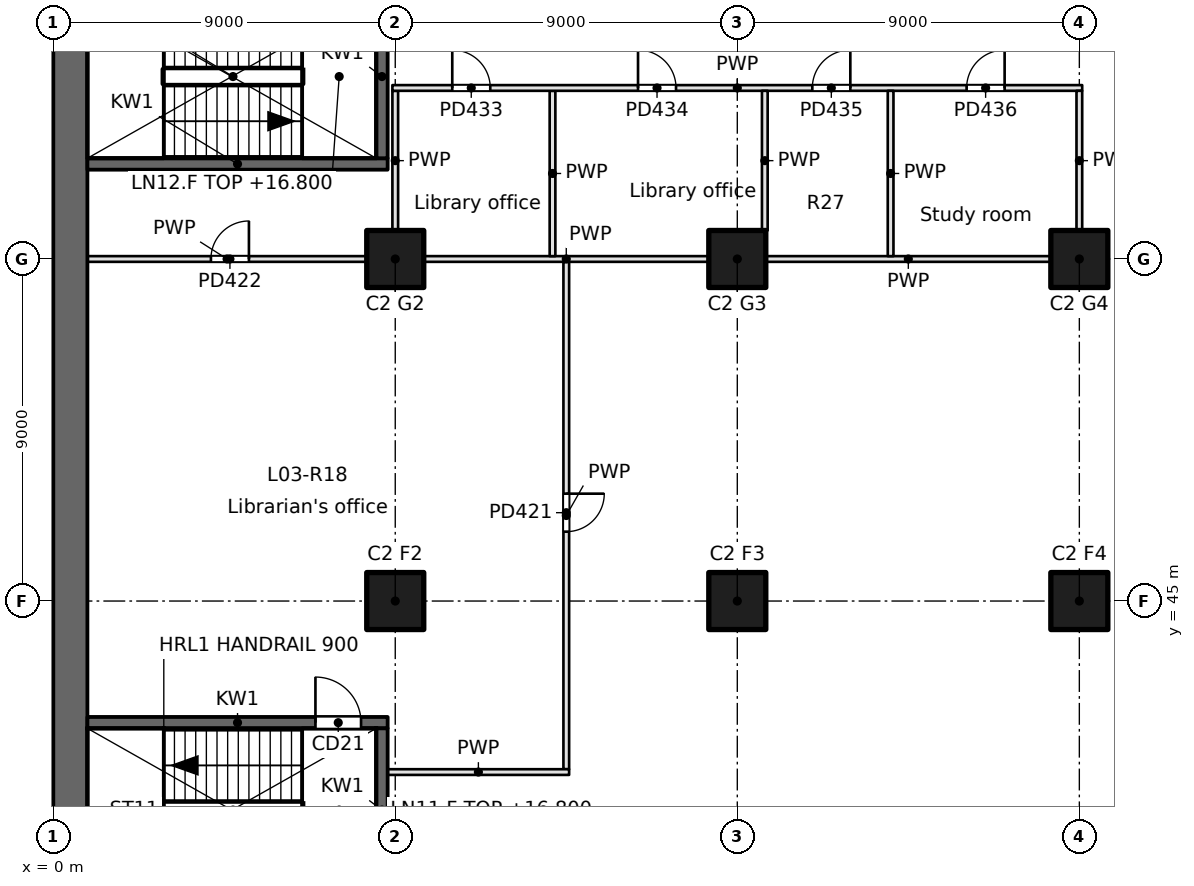
"""IFC4 building model, lengths in metres.
Left out: names, types, materials, properties, quantities, classifications, styles, units other than length and angle.
Written with IfcOpenShell. Run it as: python <this file> out.ifc"""

import sys

from ifc_helpers import new_model, si_unit, direction, frame, frame_2d, origin, origin_2d, place, context, subcontext, project, spatial, rectangle, extrude, element, fill, save


model = new_model("IFC4")
c1 = context("Model", 3, precision=1e-05, world=origin(), true_north=direction((0.0, 1.0)))
c2 = subcontext(c1, "Body", "Model", "MODEL_VIEW")
j1 = project(units=[si_unit("LENGTHUNIT", "METRE"), si_unit("PLANEANGLEUNIT", "RADIAN")], contexts=[c1])
p1 = place(None, origin())
s1 = spatial("IfcSite", under=j1, at=p1, CompositionType="ELEMENT")
p2 = place(p1, origin())
s2 = spatial("IfcBuilding", under=s1, at=p2, CompositionType="ELEMENT")
p3 = place(p2, frame((0.0, 0.0, 16.8)))
s3 = spatial("IfcBuildingStorey", under=s2, at=p3, CompositionType="ELEMENT", Elevation=16.8)
for number, where, z_axis, x_axis in (
    (1, (9.0, 45.0, 0.0), (0.0, 0.0, 1.0), (1.0, 0.0, 0.0)),
    (2, (9.0, 54.0, 0.0), (0.0, 0.0, 1.0), (1.0, 0.0, 0.0)),
    (3, (18.0, 45.0, 0.0), (0.0, 0.0, 1.0), (1.0, 0.0, 0.0)),
    (4, (18.0, 54.0, 0.0), (0.0, 0.0, 1.0), (1.0, 0.0, 0.0)),
    (5, (27.0, 45.0, 0.0), (0.0, 0.0, 1.0), (1.0, 0.0, 0.0)),
    (6, (27.0, 54.0, 0.0), (0.0, 0.0, 1.0), (1.0, 0.0, 0.0)),
):
    element("IfcColumn", number, at=place(p3, frame(where, z_axis=z_axis, x_axis=x_axis)), inside=s3, PredefinedType="COLUMN", context=c2, shape_type="SweptSolid", body=[
        extrude(rectangle(XDim=1.5, YDim=1.5, at=origin_2d()), origin(), (0.0, 0.0, 1.0), 4.8),
    ])
p4 = place(p3, frame((0.45, 94.5, 0.0), z_axis=(0.0, 0.0, 1.0), x_axis=(0.0, -1.0, 0.0)))
e7 = element("IfcWall", 7, at=p4, inside=s3, PredefinedType="SHEAR", context=c2, shape_type="SweptSolid", body=[
    extrude(rectangle(XDim=66.085, YDim=0.9, at=frame_2d((33.042, 0.0))), origin(), (0.0, 0.0, 1.0), 4.8),
])
p5 = place(p3, frame((0.9, 41.8, -0.35), z_axis=(0.0, 0.0, 1.0), x_axis=(1.0, 0.0, 0.0)))
e8 = element("IfcWall", 8, at=p5, inside=s3, PredefinedType="SOLIDWALL", context=c2, shape_type="SweptSolid", body=[
    extrude(rectangle(XDim=7.9, YDim=0.3, at=frame_2d((3.95, 0.0))), origin(), (0.0, 0.0, 1.0), 4.8),
])
p6 = place(p5, frame((6.0, 0.0, 0.35)))
e9 = element("IfcOpeningElement", 9, at=p6, cuts=e8, PredefinedType="OPENING", context=c2, shape_type="SweptSolid", body=[
    extrude(rectangle(XDim=1.2, YDim=2.1, at=frame_2d((0.6, 1.05))), frame((0.0, 0.15, 0.0), z_axis=(0.0, -1.0, 0.0), x_axis=(1.0, 0.0, 0.0)), (0.0, 0.0, 1.0), 0.3),
])
p7 = place(p3, frame((0.9, 56.5, -0.35), z_axis=(0.0, 0.0, 1.0), x_axis=(1.0, 0.0, 0.0)))
e10 = element("IfcWall", 10, at=p7, inside=s3, PredefinedType="SOLIDWALL", context=c2, shape_type="SweptSolid", body=[
    extrude(rectangle(XDim=7.9, YDim=0.3, at=frame_2d((3.95, 0.0))), origin(), (0.0, 0.0, 1.0), 4.8),
])
p8 = place(p3, frame((8.65, 37.35, -0.35), z_axis=(0.0, 0.0, 1.0), x_axis=(0.0, 1.0, 0.0)))
e11 = element("IfcWall", 11, at=p8, inside=s3, PredefinedType="SOLIDWALL", context=c2, shape_type="SweptSolid", body=[
    extrude(rectangle(XDim=4.3, YDim=0.3, at=frame_2d((2.15, 0.0))), origin(), (0.0, 0.0, 1.0), 4.8),
])
p9 = place(p3, frame((8.65, 56.65, -0.35), z_axis=(0.0, 0.0, 1.0), x_axis=(0.0, 1.0, 0.0)))
e12 = element("IfcWall", 12, at=p9, inside=s3, PredefinedType="SOLIDWALL", context=c2, shape_type="SweptSolid", body=[
    extrude(rectangle(XDim=4.3, YDim=0.3, at=frame_2d((2.15, 0.0))), origin(), (0.0, 0.0, 1.0), 4.8),
])
p10 = place(p3, frame((0.9, 54.0, 0.0), z_axis=(0.0, 0.0, 1.0), x_axis=(1.0, 0.0, 0.0)))
e13 = element("IfcWall", 13, at=p10, inside=s3, PredefinedType="PARTITIONING", context=c2, shape_type="SweptSolid", body=[
    extrude(rectangle(XDim=7.35, YDim=0.15, at=frame_2d((3.675, 0.0))), origin(), (0.0, 0.0, 1.0), 4.45),
])
p11 = place(p10, frame((3.25, 0.0, 0.0)))
e14 = element("IfcOpeningElement", 14, at=p11, cuts=e13, PredefinedType="OPENING", context=c2, shape_type="SweptSolid", body=[
    extrude(rectangle(XDim=1.0, YDim=2.1, at=frame_2d((0.5, 1.05))), frame((0.0, 0.075, 0.0), z_axis=(0.0, -1.0, 0.0), x_axis=(1.0, 0.0, 0.0)), (0.0, 0.0, 1.0), 0.15),
])
for number, where, z_axis, x_axis in (
    (15, (9.75, 54.0, 0.0), (0.0, 0.0, 1.0), (1.0, 0.0, 0.0)),
    (16, (26.25, 54.0, 0.0), (0.0, 0.0, 1.0), (-1.0, 0.0, 0.0)),
):
    element("IfcWall", number, at=place(p3, frame(where, z_axis=z_axis, x_axis=x_axis)), inside=s3, PredefinedType="PARTITIONING", context=c2, shape_type="SweptSolid", body=[
        extrude(rectangle(XDim=7.5, YDim=0.15, at=frame_2d((3.75, 0.0))), origin(), (0.0, 0.0, 1.0), 4.45),
    ])
p12 = place(p3, frame((13.5, 53.925, 0.0), z_axis=(0.0, 0.0, 1.0), x_axis=(0.0, -1.0, 0.0)))
e17 = element("IfcWall", 17, at=p12, inside=s3, PredefinedType="PARTITIONING", context=c2, shape_type="SweptSolid", body=[
    extrude(rectangle(XDim=13.35, YDim=0.15, at=frame_2d((6.675, 0.0))), origin(), (0.0, 0.0, 1.0), 4.45),
])
p13 = place(p12, frame((6.1, 0.0, 0.0)))
e18 = element("IfcOpeningElement", 18, at=p13, cuts=e17, PredefinedType="OPENING", context=c2, shape_type="SweptSolid", body=[
    extrude(rectangle(XDim=1.0, YDim=2.1, at=frame_2d((0.5, 1.05))), frame((0.0, 0.075, 0.0), z_axis=(0.0, -1.0, 0.0), x_axis=(1.0, 0.0, 0.0)), (0.0, 0.0, 1.0), 0.15),
])
p14 = place(p3, frame((13.575, 40.5, 0.0), z_axis=(0.0, 0.0, 1.0), x_axis=(-1.0, 0.0, 0.0)))
e19 = element("IfcWall", 19, at=p14, inside=s3, PredefinedType="PARTITIONING", context=c2, shape_type="SweptSolid", body=[
    extrude(rectangle(XDim=4.775, YDim=0.15, at=frame_2d((2.387, 0.0))), origin(), (0.0, 0.0, 1.0), 4.45),
])
p15 = place(p3, frame((13.138, 54.075, 0.0), z_axis=(0.0, 0.0, 1.0), x_axis=(0.0, 1.0, 0.0)))
e20 = element("IfcWall", 20, at=p15, inside=s3, PredefinedType="PARTITIONING", context=c2, shape_type="SweptSolid", body=[
    extrude(rectangle(XDim=4.35, YDim=0.15, at=frame_2d((2.175, 0.0))), origin(), (0.0, 0.0, 1.0), 4.45),
])
p16 = place(p3, frame((9.0, 54.75, 0.0), z_axis=(0.0, 0.0, 1.0), x_axis=(0.0, 1.0, 0.0)))
e21 = element("IfcWall", 21, at=p16, inside=s3, PredefinedType="PARTITIONING", context=c2, shape_type="SweptSolid", body=[
    extrude(rectangle(XDim=3.675, YDim=0.15, at=frame_2d((1.837, 0.0))), origin(), (0.0, 0.0, 1.0), 4.45),
])
p17 = place(p3, frame((8.925, 58.5, 0.0), z_axis=(0.0, 0.0, 1.0), x_axis=(1.0, 0.0, 0.0)))
e22 = element("IfcWall", 22, at=p17, inside=s3, PredefinedType="PARTITIONING", context=c2, shape_type="SweptSolid", body=[
    extrude(rectangle(XDim=18.15, YDim=0.15, at=frame_2d((9.075, 0.0))), origin(), (0.0, 0.0, 1.0), 4.45),
])
p18 = place(p17, frame((1.575, 0.0, 0.0)))
e23 = element("IfcOpeningElement", 23, at=p18, cuts=e22, PredefinedType="OPENING", context=c2, shape_type="SweptSolid", body=[
    extrude(rectangle(XDim=1.0, YDim=2.1, at=frame_2d((0.5, 1.05))), frame((0.0, 0.075, 0.0), z_axis=(0.0, -1.0, 0.0), x_axis=(1.0, 0.0, 0.0)), (0.0, 0.0, 1.0), 0.15),
])
p19 = place(p17, frame((6.463, 0.0, 0.0)))
e24 = element("IfcOpeningElement", 24, at=p19, cuts=e22, PredefinedType="OPENING", context=c2, shape_type="SweptSolid", body=[
    extrude(rectangle(XDim=1.0, YDim=2.1, at=frame_2d((0.5, 1.05))), frame((0.0, 0.075, 0.0), z_axis=(0.0, -1.0, 0.0), x_axis=(1.0, 0.0, 0.0)), (0.0, 0.0, 1.0), 0.15),
])
p20 = place(p17, frame((11.049, 0.0, 0.0)))
e25 = element("IfcOpeningElement", 25, at=p20, cuts=e22, PredefinedType="OPENING", context=c2, shape_type="SweptSolid", body=[
    extrude(rectangle(XDim=1.0, YDim=2.1, at=frame_2d((0.5, 1.05))), frame((0.0, 0.075, 0.0), z_axis=(0.0, -1.0, 0.0), x_axis=(1.0, 0.0, 0.0)), (0.0, 0.0, 1.0), 0.15),
])
p21 = place(p17, frame((15.109, 0.0, 0.0)))
e26 = element("IfcOpeningElement", 26, at=p21, cuts=e22, PredefinedType="OPENING", context=c2, shape_type="SweptSolid", body=[
    extrude(rectangle(XDim=1.0, YDim=2.1, at=frame_2d((0.5, 1.05))), frame((0.0, 0.075, 0.0), z_axis=(0.0, -1.0, 0.0), x_axis=(1.0, 0.0, 0.0)), (0.0, 0.0, 1.0), 0.15),
])
p22 = place(p3, frame((18.724, 54.75, 0.0), z_axis=(0.0, 0.0, 1.0), x_axis=(0.0, 1.0, 0.0)))
e27 = element("IfcWall", 27, at=p22, inside=s3, PredefinedType="PARTITIONING", context=c2, shape_type="SweptSolid", body=[
    extrude(rectangle(XDim=3.675, YDim=0.15, at=frame_2d((1.837, 0.0))), origin(), (0.0, 0.0, 1.0), 4.45),
])
p23 = place(p3, frame((22.034, 54.075, 0.0), z_axis=(0.0, 0.0, 1.0), x_axis=(0.0, 1.0, 0.0)))
e28 = element("IfcWall", 28, at=p23, inside=s3, PredefinedType="PARTITIONING", context=c2, shape_type="SweptSolid", body=[
    extrude(rectangle(XDim=4.35, YDim=0.15, at=frame_2d((2.175, 0.0))), origin(), (0.0, 0.0, 1.0), 4.45),
])
p24 = place(p3, frame((27.0, 58.425, 0.0), z_axis=(0.0, 0.0, 1.0), x_axis=(0.0, -1.0, 0.0)))
e29 = element("IfcWall", 29, at=p24, inside=s3, PredefinedType="PARTITIONING", context=c2, shape_type="SweptSolid", body=[
    extrude(rectangle(XDim=3.675, YDim=0.15, at=frame_2d((1.837, 0.0))), origin(), (0.0, 0.0, 1.0), 4.45),
])
p25 = place(p6, origin())
e30 = element("IfcDoor", 30, at=p25, inside=s3, OperationType="SINGLE_SWING_LEFT", PredefinedType="DOOR", context=c2, shape_type="SweptSolid", body=[
    extrude(rectangle(XDim=1.2, YDim=2.1, at=frame_2d((0.6, 1.05))), frame((0.0, 0.025, 0.0), z_axis=(0.0, -1.0, 0.0), x_axis=(1.0, 0.0, 0.0)), (0.0, 0.0, 1.0), 0.05),
])
fill(e9, e30)
p26 = place(p13, origin())
e31 = element("IfcDoor", 31, at=p26, inside=s3, OperationType="SINGLE_SWING_LEFT", PredefinedType="DOOR", context=c2, shape_type="SweptSolid", body=[
    extrude(rectangle(XDim=1.0, YDim=2.1, at=frame_2d((0.5, 1.05))), frame((0.0, 0.025, 0.0), z_axis=(0.0, -1.0, 0.0), x_axis=(1.0, 0.0, 0.0)), (0.0, 0.0, 1.0), 0.05),
])
fill(e18, e31)
p27 = place(p11, origin())
e32 = element("IfcDoor", 32, at=p27, inside=s3, OperationType="SINGLE_SWING_RIGHT", PredefinedType="DOOR", context=c2, shape_type="SweptSolid", body=[
    extrude(rectangle(XDim=1.0, YDim=2.1, at=frame_2d((0.5, 1.05))), frame((0.0, 0.025, 0.0), z_axis=(0.0, -1.0, 0.0), x_axis=(1.0, 0.0, 0.0)), (0.0, 0.0, 1.0), 0.05),
])
fill(e14, e32)
p28 = place(p18, origin())
e33 = element("IfcDoor", 33, at=p28, inside=s3, OperationType="SINGLE_SWING_LEFT", PredefinedType="DOOR", context=c2, shape_type="SweptSolid", body=[
    extrude(rectangle(XDim=1.0, YDim=2.1, at=frame_2d((0.5, 1.05))), frame((0.0, 0.025, 0.0), z_axis=(0.0, -1.0, 0.0), x_axis=(1.0, 0.0, 0.0)), (0.0, 0.0, 1.0), 0.05),
])
fill(e23, e33)
p29 = place(p19, origin())
e34 = element("IfcDoor", 34, at=p29, inside=s3, OperationType="SINGLE_SWING_LEFT", PredefinedType="DOOR", context=c2, shape_type="SweptSolid", body=[
    extrude(rectangle(XDim=1.0, YDim=2.1, at=frame_2d((0.5, 1.05))), frame((0.0, 0.025, 0.0), z_axis=(0.0, -1.0, 0.0), x_axis=(1.0, 0.0, 0.0)), (0.0, 0.0, 1.0), 0.05),
])
fill(e24, e34)
p30 = place(p20, origin())
e35 = element("IfcDoor", 35, at=p30, inside=s3, OperationType="SINGLE_SWING_RIGHT", PredefinedType="DOOR", context=c2, shape_type="SweptSolid", body=[
    extrude(rectangle(XDim=1.0, YDim=2.1, at=frame_2d((0.5, 1.05))), frame((0.0, 0.025, 0.0), z_axis=(0.0, -1.0, 0.0), x_axis=(1.0, 0.0, 0.0)), (0.0, 0.0, 1.0), 0.05),
])
fill(e25, e35)
p31 = place(p21, origin())
e36 = element("IfcDoor", 36, at=p31, inside=s3, OperationType="SINGLE_SWING_RIGHT", PredefinedType="DOOR", context=c2, shape_type="SweptSolid", body=[
    extrude(rectangle(XDim=1.0, YDim=2.1, at=frame_2d((0.5, 1.05))), frame((0.0, 0.025, 0.0), z_axis=(0.0, -1.0, 0.0), x_axis=(1.0, 0.0, 0.0)), (0.0, 0.0, 1.0), 0.05),
])
fill(e26, e36)
save(model, sys.argv[1])
